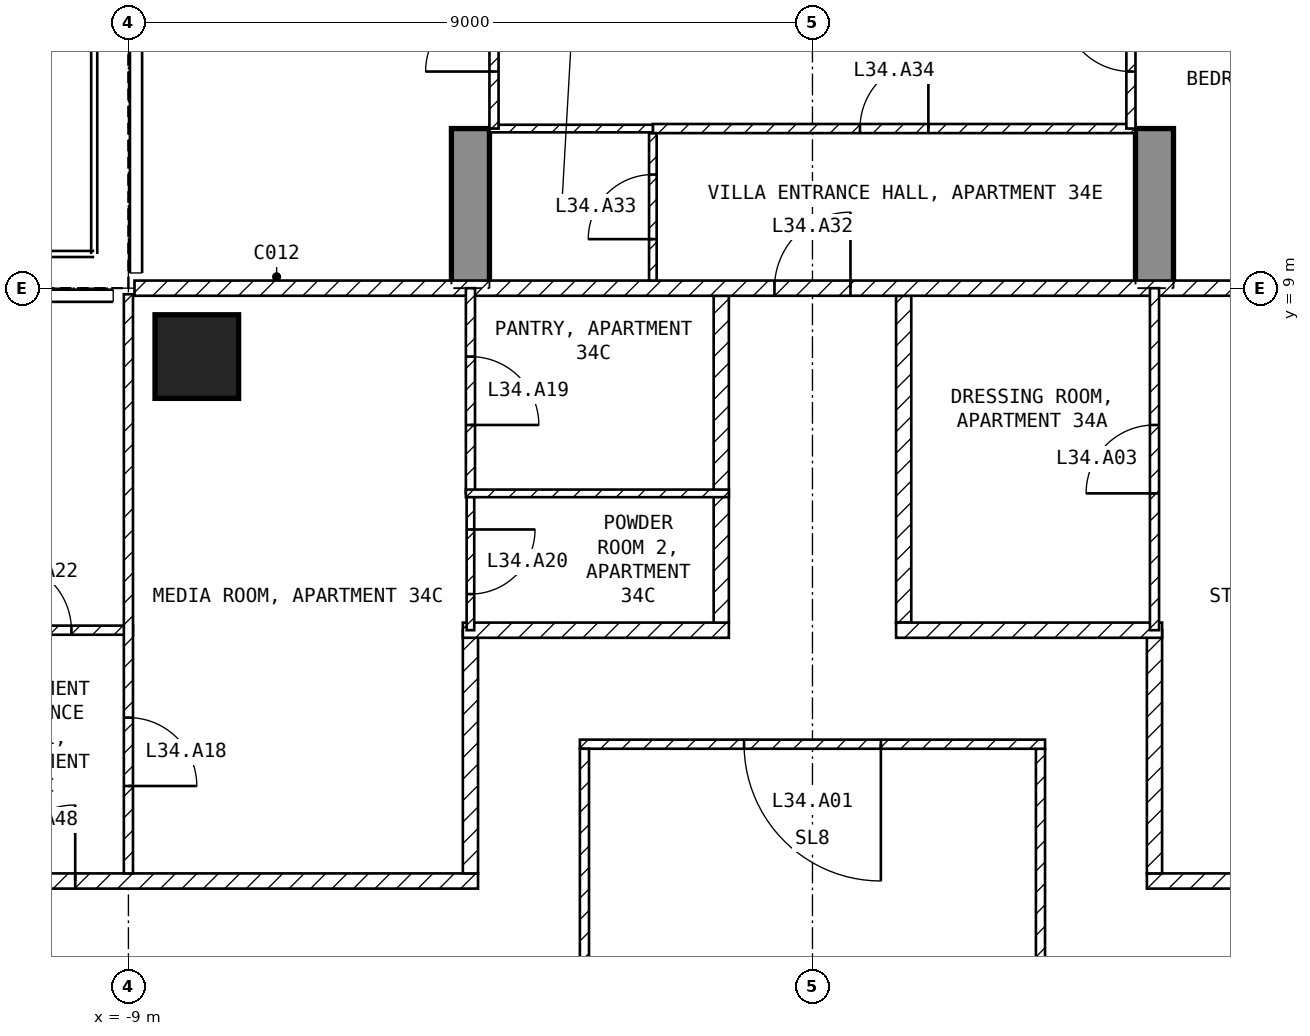
"""IFC4 building model, lengths in metres.
Left out: names, types, materials, properties, quantities, classifications, styles, units other than length and angle.
Written with IfcOpenShell. Run it as: python <this file> out.ifc"""

import sys

from ifc_helpers import new_model, si_unit, direction, frame, frame_2d, origin, origin_2d, place, context, subcontext, project, spatial, polyline, rectangle, outline, extrude, element, fill, save


model = new_model("IFC4")
c1 = context("Model", 3, precision=1e-05, world=origin(), true_north=direction((0.0, 1.0)))
c2 = subcontext(c1, "Body", "Model", "MODEL_VIEW")
j1 = project(units=[si_unit("LENGTHUNIT", "METRE"), si_unit("PLANEANGLEUNIT", "RADIAN")], contexts=[c1])
p1 = place(None, origin())
s1 = spatial("IfcSite", under=j1, at=p1, CompositionType="ELEMENT")
p2 = place(p1, origin())
s2 = spatial("IfcBuilding", under=s1, at=p2, CompositionType="ELEMENT")
p3 = place(p2, frame((0.0, 0.0, 140.9)))
s3 = spatial("IfcBuildingStorey", under=s2, at=p3, CompositionType="ELEMENT", Elevation=140.9)
p4 = place(p3, frame((-8.1, 8.1, -0.25), z_axis=(0.0, 0.0, 1.0), x_axis=(1.0, 0.0, 0.0)))
e1 = element("IfcColumn", 1, at=p4, inside=s3, PredefinedType="COLUMN", context=c2, shape_type="SweptSolid", body=[
    extrude(rectangle(XDim=1.1, YDim=1.1, at=origin_2d()), origin(), (0.0, 0.0, 1.0), 3.5),
])
for number, where, z_axis, x_axis in (
    (2, (-4.75, 9.0, -0.25), (1.0, 0.0, 0.0), (0.0, 1.0, 0.0)),
    (3, (4.25, 9.0, -0.25), (1.0, 0.0, 0.0), (0.0, 1.0, 0.0)),
):
    element("IfcWall", number, at=place(p3, frame(where, z_axis=z_axis, x_axis=x_axis)), inside=s3, PredefinedType="SHEAR", context=c2, shape_type="SweptSolid", body=[
        extrude(outline(polyline([(0.0, 0.0), (2.1, 0.0), (2.1, 2.65), (4.5, 2.65), (4.5, 0.0), (9.9, 0.0), (9.9, 2.65), (12.3, 2.65), (12.3, 0.0), (16.55, 0.0), (16.55, 3.5), (0.0, 3.5), (0.0, 0.0)])), origin(), (0.0, 0.0, 1.0), 0.5),
    ])
p5 = place(p3, frame((3.0, -2.94, 0.0), z_axis=(0.0, 0.0, 1.0), x_axis=(0.0, 1.0, 0.0)))
e4 = element("IfcWall", 4, at=p5, inside=s3, PredefinedType="PARTITIONING", context=c2, shape_type="SweptSolid", body=[
    extrude(rectangle(XDim=5.88, YDim=0.12, at=frame_2d((2.94, 0.0))), origin(), (0.0, 0.0, 1.0), 3.25),
])
p6 = place(p3, frame((3.06, 3.0, 0.0), z_axis=(0.0, 0.0, 1.0), x_axis=(-1.0, 0.0, 0.0)))
e5 = element("IfcWall", 5, at=p6, inside=s3, PredefinedType="PARTITIONING", context=c2, shape_type="SweptSolid", body=[
    extrude(rectangle(XDim=6.12, YDim=0.12, at=frame_2d((3.06, 0.0))), origin(), (0.0, 0.0, 1.0), 3.25),
])
p7 = place(p6, frame((2.16, 0.0, 0.0)))
e6 = element("IfcOpeningElement", 6, at=p7, cuts=e5, PredefinedType="OPENING", context=c2, shape_type="SweptSolid", body=[
    extrude(rectangle(XDim=1.8, YDim=2.1, at=frame_2d((0.9, 1.05))), frame((0.0, 0.07, 0.0), z_axis=(0.0, -1.0, 0.0), x_axis=(1.0, 0.0, 0.0)), (0.0, 0.0, 1.0), 0.14),
])
p8 = place(p3, frame((-3.0, 2.94, 0.0), z_axis=(0.0, 0.0, 1.0), x_axis=(0.0, -1.0, 0.0)))
e7 = element("IfcWall", 7, at=p8, inside=s3, PredefinedType="PARTITIONING", context=c2, shape_type="SweptSolid", body=[
    extrude(rectangle(XDim=5.88, YDim=0.12, at=frame_2d((2.94, 0.0))), origin(), (0.0, 0.0, 1.0), 3.25),
])
p9 = place(p3, frame((4.4, 1.2, 0.0), z_axis=(0.0, 0.0, 1.0), x_axis=(1.0, 0.0, 0.0)))
e8 = element("IfcWall", 8, at=p9, inside=s3, PredefinedType="PARTITIONING", context=c2, shape_type="SweptSolid", body=[
    extrude(rectangle(XDim=17.2, YDim=0.2, at=frame_2d((8.6, 0.0))), origin(), (0.0, 0.0, 1.0), 3.25),
])
p10 = place(p9, frame((8.3, 0.0, 0.0)))
e9 = element("IfcOpeningElement", 9, at=p10, cuts=e8, PredefinedType="OPENING", context=c2, shape_type="SweptSolid", body=[
    extrude(rectangle(XDim=1.0, YDim=2.1, at=frame_2d((0.5, 1.05))), frame((0.0, 0.11, 0.0), z_axis=(0.0, -1.0, 0.0), x_axis=(1.0, 0.0, 0.0)), (0.0, 0.0, 1.0), 0.22),
])
p11 = place(p3, frame((4.5, 4.5, 0.0), z_axis=(0.0, 0.0, 1.0), x_axis=(0.0, -1.0, 0.0)))
e10 = element("IfcWall", 10, at=p11, inside=s3, PredefinedType="PARTITIONING", context=c2, shape_type="SweptSolid", body=[
    extrude(rectangle(XDim=3.2, YDim=0.2, at=frame_2d((1.6, 0.0))), origin(), (0.0, 0.0, 1.0), 3.25),
])
p12 = place(p3, frame((1.2, 8.9, 0.0), z_axis=(0.0, 0.0, 1.0), x_axis=(0.0, -1.0, 0.0)))
e11 = element("IfcWall", 11, at=p12, inside=s3, PredefinedType="PARTITIONING", context=c2, shape_type="SweptSolid", body=[
    extrude(rectangle(XDim=4.3, YDim=0.2, at=frame_2d((2.15, 0.0))), origin(), (0.0, 0.0, 1.0), 3.25),
])
p13 = place(p3, frame((1.1, 4.5, 0.0), z_axis=(0.0, 0.0, 1.0), x_axis=(1.0, 0.0, 0.0)))
e12 = element("IfcWall", 12, at=p13, inside=s3, PredefinedType="PARTITIONING", context=c2, shape_type="SweptSolid", body=[
    extrude(rectangle(XDim=3.5, YDim=0.2, at=frame_2d((1.75, 0.0))), origin(), (0.0, 0.0, 1.0), 3.25),
])
p14 = place(p3, frame((-21.6, 1.2, 0.0), z_axis=(0.0, 0.0, 1.0), x_axis=(1.0, 0.0, 0.0)))
e13 = element("IfcWall", 13, at=p14, inside=s3, PredefinedType="PARTITIONING", context=c2, shape_type="SweptSolid", body=[
    extrude(rectangle(XDim=17.2, YDim=0.2, at=frame_2d((8.6, 0.0))), origin(), (0.0, 0.0, 1.0), 3.25),
])
p15 = place(p14, frame((10.9, 0.0, 0.0)))
e14 = element("IfcOpeningElement", 14, at=p15, cuts=e13, PredefinedType="OPENING", context=c2, shape_type="SweptSolid", body=[
    extrude(rectangle(XDim=1.0, YDim=2.1, at=frame_2d((0.5, 1.05))), frame((0.0, 0.11, 0.0), z_axis=(0.0, -1.0, 0.0), x_axis=(1.0, 0.0, 0.0)), (0.0, 0.0, 1.0), 0.22),
])
p16 = place(p3, frame((-4.5, 1.3, 0.0), z_axis=(0.0, 0.0, 1.0), x_axis=(0.0, 1.0, 0.0)))
e15 = element("IfcWall", 15, at=p16, inside=s3, PredefinedType="PARTITIONING", context=c2, shape_type="SweptSolid", body=[
    extrude(rectangle(XDim=3.2, YDim=0.2, at=frame_2d((1.6, 0.0))), origin(), (0.0, 0.0, 1.0), 3.25),
])
p17 = place(p3, frame((-4.6, 4.5, 0.0), z_axis=(0.0, 0.0, 1.0), x_axis=(1.0, 0.0, 0.0)))
e16 = element("IfcWall", 16, at=p17, inside=s3, PredefinedType="PARTITIONING", context=c2, shape_type="SweptSolid", body=[
    extrude(rectangle(XDim=3.5, YDim=0.2, at=frame_2d((1.75, 0.0))), origin(), (0.0, 0.0, 1.0), 3.25),
])
p18 = place(p3, frame((-1.2, 4.6, 0.0), z_axis=(0.0, 0.0, 1.0), x_axis=(0.0, 1.0, 0.0)))
e17 = element("IfcWall", 17, at=p18, inside=s3, PredefinedType="PARTITIONING", context=c2, shape_type="SweptSolid", body=[
    extrude(rectangle(XDim=4.3, YDim=0.2, at=frame_2d((2.15, 0.0))), origin(), (0.0, 0.0, 1.0), 3.25),
])
p19 = place(p3, frame((-8.92, 9.0, 0.0), z_axis=(0.0, 0.0, 1.0), x_axis=(1.0, 0.0, 0.0)))
e18 = element("IfcWall", 18, at=p19, inside=s3, PredefinedType="PARTITIONING", context=c2, shape_type="SweptSolid", body=[
    extrude(rectangle(XDim=17.84, YDim=0.2, at=frame_2d((8.92, 0.0))), origin(), (0.0, 0.0, 1.0), 3.25),
])
p20 = place(p19, frame((8.42, 0.0, 0.0)))
e19 = element("IfcOpeningElement", 19, at=p20, cuts=e18, PredefinedType="OPENING", context=c2, shape_type="SweptSolid", body=[
    extrude(rectangle(XDim=1.0, YDim=2.1, at=frame_2d((0.5, 1.05))), frame((0.0, 0.11, 0.0), z_axis=(0.0, -1.0, 0.0), x_axis=(1.0, 0.0, 0.0)), (0.0, 0.0, 1.0), 0.22),
])
p21 = place(p3, frame((4.5, 4.5, 0.0), z_axis=(0.0, 0.0, 1.0), x_axis=(0.0, 1.0, 0.0)))
e20 = element("IfcWall", 20, at=p21, inside=s3, PredefinedType="PARTITIONING", context=c2, shape_type="SweptSolid", body=[
    extrude(rectangle(XDim=4.5, YDim=0.12, at=frame_2d((2.25, 0.0))), origin(), (0.0, 0.0, 1.0), 3.25),
])
p22 = place(p21, frame((1.8, 0.0, 0.0)))
e21 = element("IfcOpeningElement", 21, at=p22, cuts=e20, PredefinedType="OPENING", context=c2, shape_type="SweptSolid", body=[
    extrude(rectangle(XDim=0.9, YDim=2.1, at=frame_2d((0.45, 1.05))), frame((0.0, 0.07, 0.0), z_axis=(0.0, -1.0, 0.0), x_axis=(1.0, 0.0, 0.0)), (0.0, 0.0, 1.0), 0.14),
])
p23 = place(p3, frame((-14.4, 4.5, 0.0), z_axis=(0.0, 0.0, 1.0), x_axis=(1.0, 0.0, 0.0)))
e22 = element("IfcWall", 22, at=p23, inside=s3, PredefinedType="PARTITIONING", context=c2, shape_type="SweptSolid", body=[
    extrude(rectangle(XDim=5.46, YDim=0.12, at=frame_2d((2.73, 0.0))), origin(), (0.0, 0.0, 1.0), 3.25),
])
p24 = place(p23, frame((3.75, 0.0, 0.0)))
e23 = element("IfcOpeningElement", 23, at=p24, cuts=e22, PredefinedType="OPENING", context=c2, shape_type="SweptSolid", body=[
    extrude(rectangle(XDim=0.9, YDim=2.1, at=frame_2d((0.45, 1.05))), frame((0.0, 0.07, 0.0), z_axis=(0.0, -1.0, 0.0), x_axis=(1.0, 0.0, 0.0)), (0.0, 0.0, 1.0), 0.14),
])
p25 = place(p3, frame((-9.0, 8.92, 0.0), z_axis=(0.0, 0.0, 1.0), x_axis=(0.0, -1.0, 0.0)))
e24 = element("IfcWall", 24, at=p25, inside=s3, PredefinedType="PARTITIONING", context=c2, shape_type="SweptSolid", body=[
    extrude(rectangle(XDim=7.62, YDim=0.12, at=frame_2d((3.81, 0.0))), origin(), (0.0, 0.0, 1.0), 3.25),
])
p26 = place(p25, frame((5.57, 0.0, 0.0)))
e25 = element("IfcOpeningElement", 25, at=p26, cuts=e24, PredefinedType="OPENING", context=c2, shape_type="SweptSolid", body=[
    extrude(rectangle(XDim=0.9, YDim=2.1, at=frame_2d((0.45, 1.05))), frame((0.0, 0.07, 0.0), z_axis=(0.0, -1.0, 0.0), x_axis=(1.0, 0.0, 0.0)), (0.0, 0.0, 1.0), 0.14),
])
p27 = place(p3, frame((-4.5, 6.3, 0.0), z_axis=(0.0, 0.0, 1.0), x_axis=(0.0, -1.0, 0.0)))
e26 = element("IfcWall", 26, at=p27, inside=s3, PredefinedType="PARTITIONING", context=c2, shape_type="SweptSolid", body=[
    extrude(rectangle(XDim=1.8, YDim=0.1, at=frame_2d((0.9, 0.0))), origin(), (0.0, 0.0, 1.0), 3.25),
])
p28 = place(p27, frame((0.475, 0.0, 0.0)))
e27 = element("IfcOpeningElement", 27, at=p28, cuts=e26, PredefinedType="OPENING", context=c2, shape_type="SweptSolid", body=[
    extrude(rectangle(XDim=0.85, YDim=2.1, at=frame_2d((0.425, 1.05))), frame((0.0, 0.06, 0.0), z_axis=(0.0, -1.0, 0.0), x_axis=(1.0, 0.0, 0.0)), (0.0, 0.0, 1.0), 0.12),
])
p29 = place(p3, frame((-4.5, 9.0, 0.0), z_axis=(0.0, 0.0, 1.0), x_axis=(0.0, -1.0, 0.0)))
e28 = element("IfcWall", 28, at=p29, inside=s3, PredefinedType="PARTITIONING", context=c2, shape_type="SweptSolid", body=[
    extrude(rectangle(XDim=2.7, YDim=0.12, at=frame_2d((1.35, 0.0))), origin(), (0.0, 0.0, 1.0), 3.25),
])
p30 = place(p29, frame((0.9, 0.0, 0.0)))
e29 = element("IfcOpeningElement", 29, at=p30, cuts=e28, PredefinedType="OPENING", context=c2, shape_type="SweptSolid", body=[
    extrude(rectangle(XDim=0.9, YDim=2.1, at=frame_2d((0.45, 1.05))), frame((0.0, 0.07, 0.0), z_axis=(0.0, -1.0, 0.0), x_axis=(1.0, 0.0, 0.0)), (0.0, 0.0, 1.0), 0.14),
])
p31 = place(p3, frame((-4.56, 6.3, 0.0), z_axis=(0.0, 0.0, 1.0), x_axis=(1.0, 0.0, 0.0)))
e30 = element("IfcWall", 30, at=p31, inside=s3, PredefinedType="PARTITIONING", context=c2, shape_type="SweptSolid", body=[
    extrude(rectangle(XDim=3.46, YDim=0.1, at=frame_2d((1.73, 0.0))), origin(), (0.0, 0.0, 1.0), 3.25),
])
p32 = place(p3, frame((-2.1, 9.1, 0.0), z_axis=(0.0, 0.0, 1.0), x_axis=(0.0, 1.0, 0.0)))
e31 = element("IfcWall", 31, at=p32, inside=s3, PredefinedType="PARTITIONING", context=c2, shape_type="SweptSolid", body=[
    extrude(rectangle(XDim=1.94, YDim=0.1, at=frame_2d((0.97, 0.0))), origin(), (0.0, 0.0, 1.0), 3.25),
])
p33 = place(p32, frame((0.545, 0.0, 0.0)))
e32 = element("IfcOpeningElement", 32, at=p33, cuts=e31, PredefinedType="OPENING", context=c2, shape_type="SweptSolid", body=[
    extrude(rectangle(XDim=0.85, YDim=2.1, at=frame_2d((0.425, 1.05))), frame((0.0, 0.06, 0.0), z_axis=(0.0, -1.0, 0.0), x_axis=(1.0, 0.0, 0.0)), (0.0, 0.0, 1.0), 0.12),
])
p34 = place(p3, frame((-2.1, 11.1, 0.0), z_axis=(0.0, 0.0, 1.0), x_axis=(1.0, 0.0, 0.0)))
e33 = element("IfcWall", 33, at=p34, inside=s3, PredefinedType="PARTITIONING", context=c2, shape_type="SweptSolid", body=[
    extrude(rectangle(XDim=6.35, YDim=0.12, at=frame_2d((3.175, 0.0))), origin(), (0.0, 0.0, 1.0), 3.25),
])
p35 = place(p34, frame((2.725, 0.0, 0.0)))
e34 = element("IfcOpeningElement", 34, at=p35, cuts=e33, PredefinedType="OPENING", context=c2, shape_type="SweptSolid", body=[
    extrude(rectangle(XDim=0.9, YDim=2.1, at=frame_2d((0.45, 1.05))), frame((0.0, 0.07, 0.0), z_axis=(0.0, -1.0, 0.0), x_axis=(1.0, 0.0, 0.0)), (0.0, 0.0, 1.0), 0.14),
])
p36 = place(p3, frame((-4.25, 11.1, 0.0), z_axis=(0.0, 0.0, 1.0), x_axis=(1.0, 0.0, 0.0)))
e35 = element("IfcWall", 35, at=p36, inside=s3, PredefinedType="PARTITIONING", context=c2, shape_type="SweptSolid", body=[
    extrude(rectangle(XDim=2.15, YDim=0.1, at=frame_2d((1.075, 0.0))), origin(), (0.0, 0.0, 1.0), 3.25),
])
p37 = place(p3, frame((4.19, 11.1, 0.0), z_axis=(0.0, 0.0, 1.0), x_axis=(0.0, 1.0, 0.0)))
e36 = element("IfcWall", 36, at=p37, inside=s3, PredefinedType="PARTITIONING", context=c2, shape_type="SweptSolid", body=[
    extrude(rectangle(XDim=2.4, YDim=0.12, at=frame_2d((1.2, 0.0))), origin(), (0.0, 0.0, 1.0), 2.4),
])
p38 = place(p37, frame((0.75, 0.0, 0.0)))
e37 = element("IfcOpeningElement", 37, at=p38, cuts=e36, PredefinedType="OPENING", context=c2, shape_type="SweptSolid", body=[
    extrude(rectangle(XDim=0.9, YDim=2.1, at=frame_2d((0.45, 1.05))), frame((0.0, 0.07, 0.0), z_axis=(0.0, -1.0, 0.0), x_axis=(1.0, 0.0, 0.0)), (0.0, 0.0, 1.0), 0.14),
])
p39 = place(p3, frame((-4.19, 11.1, 0.0), z_axis=(0.0, 0.0, 1.0), x_axis=(0.0, 1.0, 0.0)))
e38 = element("IfcWall", 38, at=p39, inside=s3, PredefinedType="PARTITIONING", context=c2, shape_type="SweptSolid", body=[
    extrude(rectangle(XDim=2.4, YDim=0.12, at=frame_2d((1.2, 0.0))), origin(), (0.0, 0.0, 1.0), 2.4),
])
p40 = place(p39, frame((0.75, 0.0, 0.0)))
e39 = element("IfcOpeningElement", 39, at=p40, cuts=e38, PredefinedType="OPENING", context=c2, shape_type="SweptSolid", body=[
    extrude(rectangle(XDim=0.9, YDim=2.1, at=frame_2d((0.45, 1.05))), frame((0.0, 0.07, 0.0), z_axis=(0.0, -1.0, 0.0), x_axis=(1.0, 0.0, 0.0)), (0.0, 0.0, 1.0), 0.14),
])
p41 = place(p7, origin())
e40 = element("IfcDoor", 40, at=p41, inside=s3, OperationType="SINGLE_SWING_LEFT", PredefinedType="DOOR", context=c2, shape_type="SweptSolid", body=[
    extrude(rectangle(XDim=1.8, YDim=2.1, at=frame_2d((0.9, 1.05))), frame((0.0, 0.025, 0.0), z_axis=(0.0, -1.0, 0.0), x_axis=(1.0, 0.0, 0.0)), (0.0, 0.0, 1.0), 0.05),
])
fill(e6, e40)
p42 = place(p22, origin())
e41 = element("IfcDoor", 41, at=p42, inside=s3, OperationType="SINGLE_SWING_LEFT", PredefinedType="DOOR", context=c2, shape_type="SweptSolid", body=[
    extrude(rectangle(XDim=0.9, YDim=2.1, at=frame_2d((0.45, 1.05))), frame((0.0, 0.025, 0.0), z_axis=(0.0, -1.0, 0.0), x_axis=(1.0, 0.0, 0.0)), (0.0, 0.0, 1.0), 0.05),
])
fill(e21, e41)
p43 = place(p26, origin())
e42 = element("IfcDoor", 42, at=p43, inside=s3, OperationType="SINGLE_SWING_RIGHT", PredefinedType="DOOR", context=c2, shape_type="SweptSolid", body=[
    extrude(rectangle(XDim=0.9, YDim=2.1, at=frame_2d((0.45, 1.05))), frame((0.0, 0.025, 0.0), z_axis=(0.0, -1.0, 0.0), x_axis=(1.0, 0.0, 0.0)), (0.0, 0.0, 1.0), 0.05),
])
fill(e25, e42)
p44 = place(p30, origin())
e43 = element("IfcDoor", 43, at=p44, inside=s3, OperationType="SINGLE_SWING_RIGHT", PredefinedType="DOOR", context=c2, shape_type="SweptSolid", body=[
    extrude(rectangle(XDim=0.9, YDim=2.1, at=frame_2d((0.45, 1.05))), frame((0.0, 0.025, 0.0), z_axis=(0.0, -1.0, 0.0), x_axis=(1.0, 0.0, 0.0)), (0.0, 0.0, 1.0), 0.05),
])
fill(e29, e43)
p45 = place(p28, origin())
e44 = element("IfcDoor", 44, at=p45, inside=s3, OperationType="SINGLE_SWING_LEFT", PredefinedType="DOOR", context=c2, shape_type="SweptSolid", body=[
    extrude(rectangle(XDim=0.85, YDim=2.1, at=frame_2d((0.425, 1.05))), frame((0.0, 0.025, 0.0), z_axis=(0.0, -1.0, 0.0), x_axis=(1.0, 0.0, 0.0)), (0.0, 0.0, 1.0), 0.05),
])
fill(e27, e44)
p46 = place(p24, origin())
e45 = element("IfcDoor", 45, at=p46, inside=s3, OperationType="SINGLE_SWING_LEFT", PredefinedType="DOOR", context=c2, shape_type="SweptSolid", body=[
    extrude(rectangle(XDim=0.9, YDim=2.1, at=frame_2d((0.45, 1.05))), frame((0.0, 0.025, 0.0), z_axis=(0.0, -1.0, 0.0), x_axis=(1.0, 0.0, 0.0)), (0.0, 0.0, 1.0), 0.05),
])
fill(e23, e45)
p47 = place(p20, origin())
e46 = element("IfcDoor", 46, at=p47, inside=s3, OperationType="SINGLE_SWING_RIGHT", PredefinedType="DOOR", context=c2, shape_type="SweptSolid", body=[
    extrude(rectangle(XDim=1.0, YDim=2.1, at=frame_2d((0.5, 1.05))), frame((0.0, 0.025, 0.0), z_axis=(0.0, -1.0, 0.0), x_axis=(1.0, 0.0, 0.0)), (0.0, 0.0, 1.0), 0.05),
])
fill(e19, e46)
p48 = place(p33, origin())
e47 = element("IfcDoor", 47, at=p48, inside=s3, OperationType="SINGLE_SWING_LEFT", PredefinedType="DOOR", context=c2, shape_type="SweptSolid", body=[
    extrude(rectangle(XDim=0.85, YDim=2.1, at=frame_2d((0.425, 1.05))), frame((0.0, 0.025, 0.0), z_axis=(0.0, -1.0, 0.0), x_axis=(1.0, 0.0, 0.0)), (0.0, 0.0, 1.0), 0.05),
])
fill(e32, e47)
p49 = place(p35, origin())
e48 = element("IfcDoor", 48, at=p49, inside=s3, OperationType="SINGLE_SWING_RIGHT", PredefinedType="DOOR", context=c2, shape_type="SweptSolid", body=[
    extrude(rectangle(XDim=0.9, YDim=2.1, at=frame_2d((0.45, 1.05))), frame((0.0, 0.025, 0.0), z_axis=(0.0, -1.0, 0.0), x_axis=(1.0, 0.0, 0.0)), (0.0, 0.0, 1.0), 0.05),
])
fill(e34, e48)
p50 = place(p15, origin())
e49 = element("IfcDoor", 49, at=p50, inside=s3, OperationType="SINGLE_SWING_RIGHT", PredefinedType="DOOR", context=c2, shape_type="SweptSolid", body=[
    extrude(rectangle(XDim=1.0, YDim=2.1, at=frame_2d((0.5, 1.05))), frame((0.0, 0.025, 0.0), z_axis=(0.0, -1.0, 0.0), x_axis=(1.0, 0.0, 0.0)), (0.0, 0.0, 1.0), 0.05),
])
fill(e14, e49)
p51 = place(p38, origin())
e50 = element("IfcDoor", 50, at=p51, inside=s3, OperationType="SINGLE_SWING_RIGHT", PredefinedType="DOOR", context=c2, shape_type="SweptSolid", body=[
    extrude(rectangle(XDim=0.9, YDim=2.1, at=frame_2d((0.45, 1.05))), frame((0.0, 0.025, 0.0), z_axis=(0.0, -1.0, 0.0), x_axis=(1.0, 0.0, 0.0)), (0.0, 0.0, 1.0), 0.05),
])
fill(e37, e50)
p52 = place(p40, origin())
e51 = element("IfcDoor", 51, at=p52, inside=s3, OperationType="SINGLE_SWING_LEFT", PredefinedType="DOOR", context=c2, shape_type="SweptSolid", body=[
    extrude(rectangle(XDim=0.9, YDim=2.1, at=frame_2d((0.45, 1.05))), frame((0.0, 0.025, 0.0), z_axis=(0.0, -1.0, 0.0), x_axis=(1.0, 0.0, 0.0)), (0.0, 0.0, 1.0), 0.05),
])
fill(e39, e51)
save(model, sys.argv[1])
